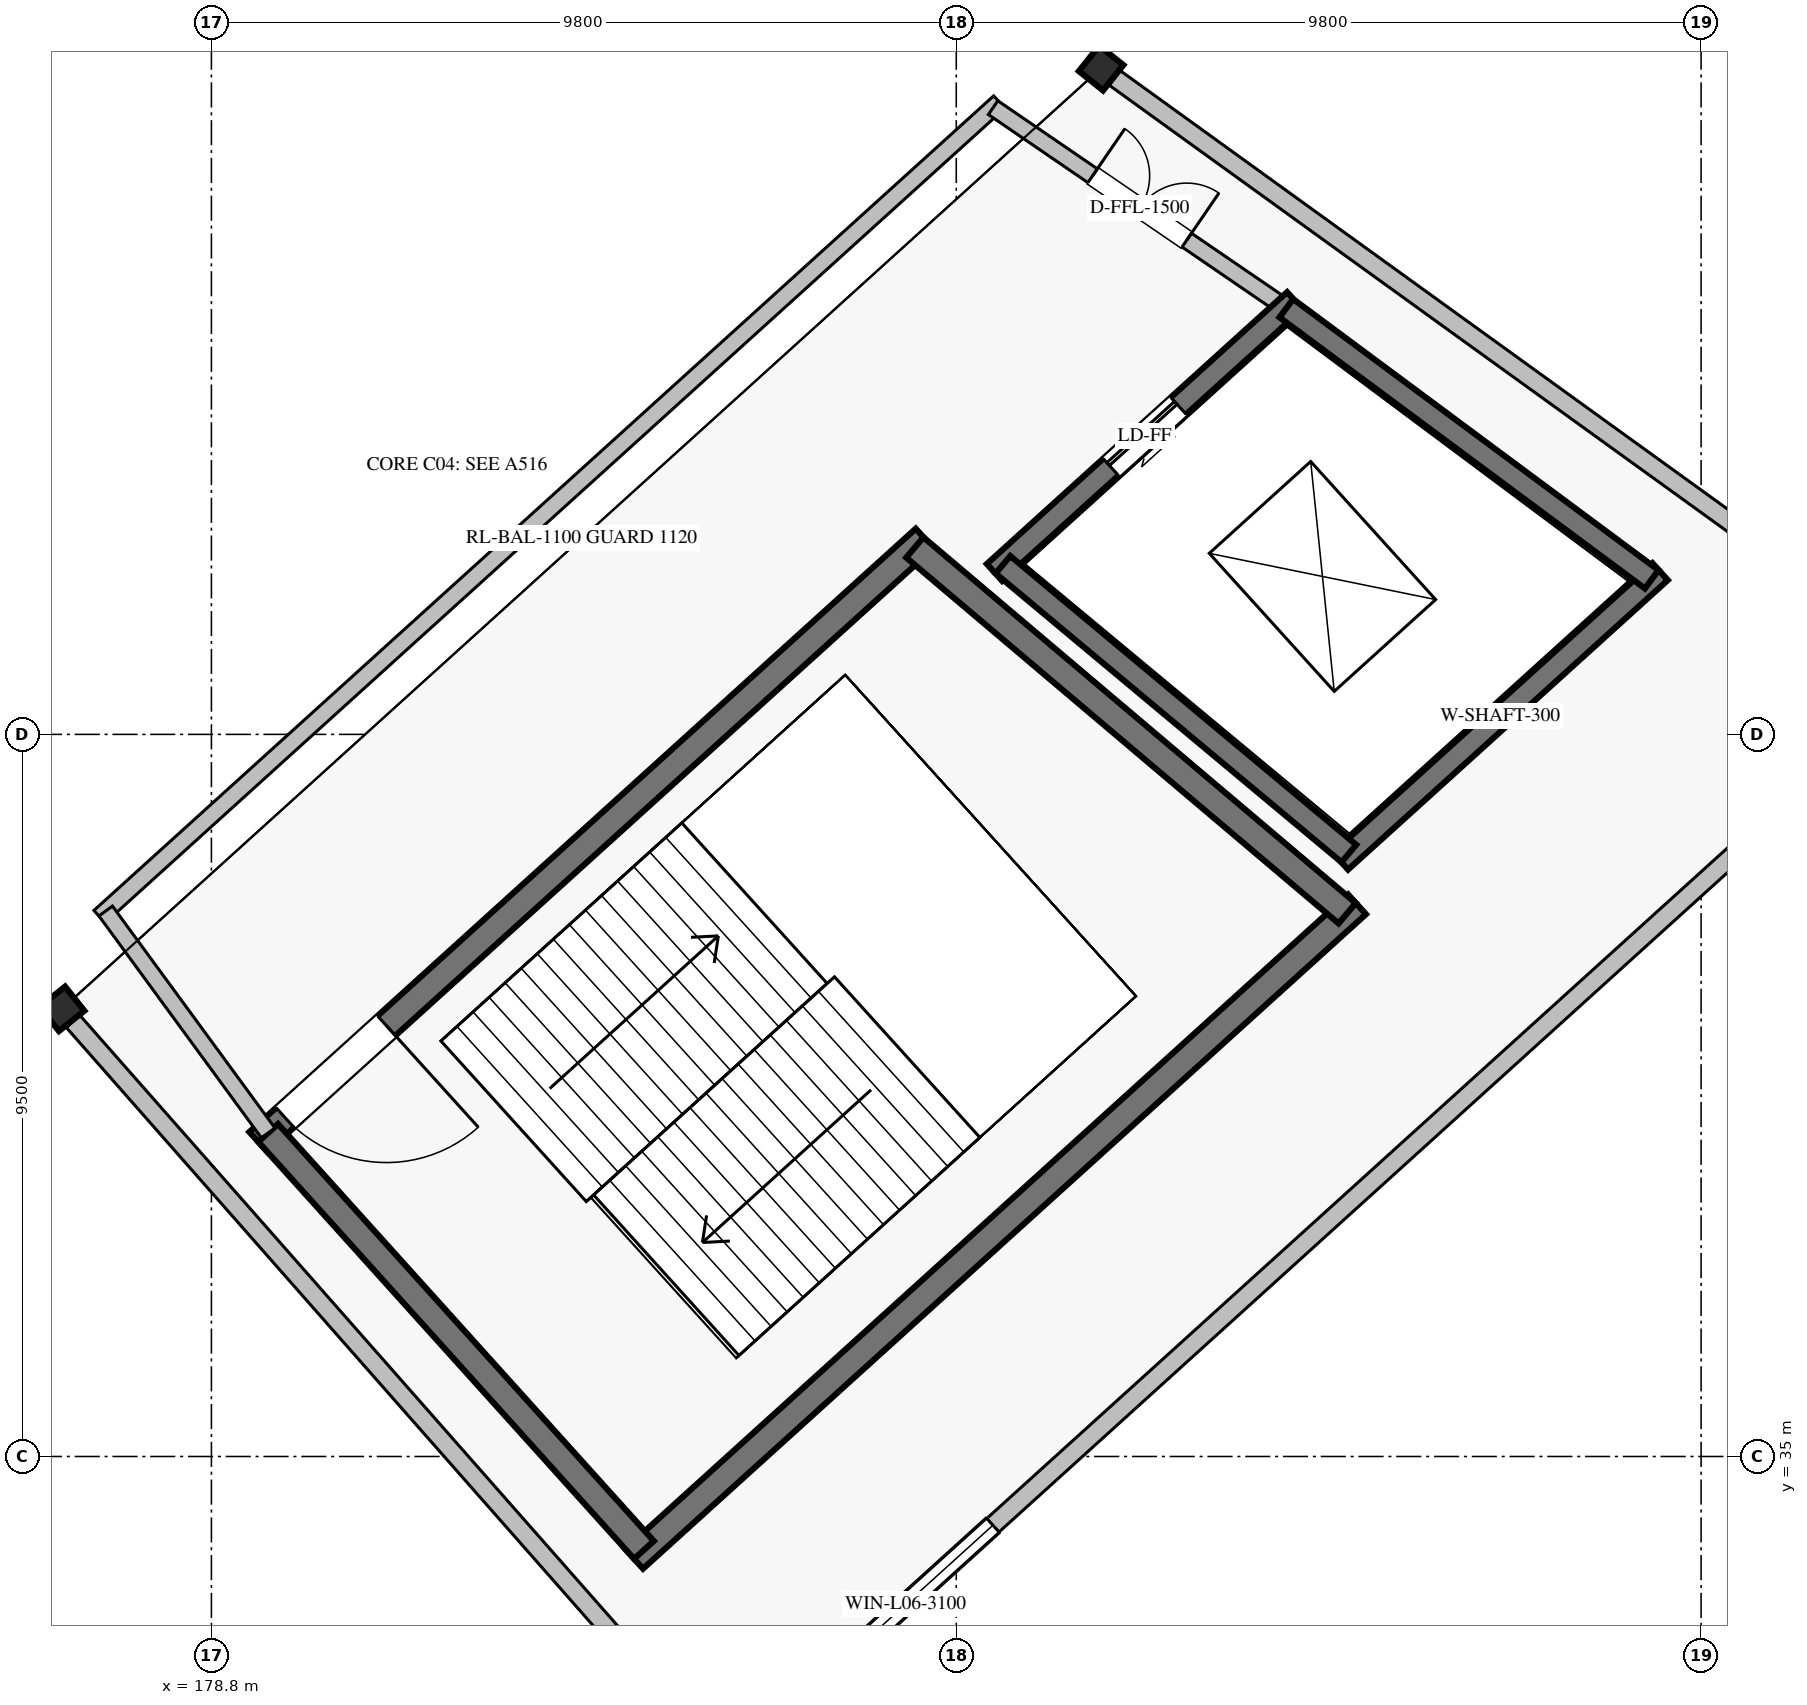
"""IFC4 building model, lengths in metres.
Left out: names, types, materials, properties, quantities, classifications, styles, units other than length and angle.
Written with IfcOpenShell. Run it as: python <this file> out.ifc"""

import sys

from ifc_helpers import new_model, si_unit, direction, frame, frame_2d, origin, origin_2d, place, context, subcontext, project, spatial, rectangle, i_section, extrude, element, fill, save


model = new_model("IFC4")
c1 = context("Model", 3, precision=1e-05, world=origin(), true_north=direction((0.0, 1.0)))
c2 = subcontext(c1, "Body", "Model", "MODEL_VIEW")
j1 = project(units=[si_unit("LENGTHUNIT", "METRE"), si_unit("PLANEANGLEUNIT", "RADIAN")], contexts=[c1])
p1 = place(None, origin())
s1 = spatial("IfcSite", under=j1, at=p1, CompositionType="ELEMENT")
p2 = place(p1, origin())
s2 = spatial("IfcBuilding", under=s1, at=p2, CompositionType="ELEMENT")
p3 = place(p2, frame((0.0, 0.0, 31.28)))
s3 = spatial("IfcBuildingStorey", under=s2, at=p3, CompositionType="ELEMENT", Elevation=31.28)
for number, where, z_axis, x_axis in (
    (1, (176.834, 40.889, 0.0), (0.0, 0.0, 1.0), (0.623, -0.782, 0.0)),
    (2, (190.506, 53.266, 0.0), (0.0, 0.0, 1.0), (0.782, -0.623, 0.0)),
):
    element("IfcColumn", number, at=place(p3, frame(where, z_axis=z_axis, x_axis=x_axis)), inside=s3, PredefinedType="COLUMN", context=c2, shape_type="SweptSolid", body=[
        extrude(i_section(OverallWidth=0.407, OverallDepth=0.428, WebThickness=0.02, FlangeThickness=0.035, FilletRadius=0.013, at=origin_2d()), origin(), (0.0, 0.0, 1.0), 5.44),
    ])
p4 = place(p3, frame((185.746, 31.075, 0.0), z_axis=(0.0, 0.0, 1.0), x_axis=(0.74134637924, 0.671122601309, 0.0)))
e3 = element("IfcWall", 3, at=p4, inside=s3, PredefinedType="SOLIDWALL", context=c2, shape_type="SweptSolid", body=[
    extrude(rectangle(XDim=21.044, YDim=0.24, at=frame_2d((10.522, 0.0))), origin(), (0.0, 0.0, 1.0), 4.358),
])
p5 = place(p4, frame((1.4, 0.0, 1.0)))
e4 = element("IfcOpeningElement", 4, at=p5, cuts=e3, PredefinedType="OPENING", context=c2, shape_type="SweptSolid", body=[
    extrude(rectangle(XDim=3.1, YDim=2.15, at=frame_2d((1.55, 1.075))), frame((0.0, 0.13, 0.0), z_axis=(0.0, -1.0, 0.0), x_axis=(1.0, 0.0, 0.0)), (0.0, 0.0, 1.0), 0.26),
])
p6 = place(p3, frame((176.98, 40.724, 0.0), z_axis=(0.0, 0.0, 1.0), x_axis=(0.661029266372, -0.750360119542, 0.0)))
e5 = element("IfcWall", 5, at=p6, inside=s3, PredefinedType="SOLIDWALL", context=c2, shape_type="SweptSolid", body=[
    extrude(rectangle(XDim=12.818, YDim=0.24, at=frame_2d((6.409, 0.0))), origin(), (0.0, 0.0, 1.0), 4.458),
])
p7 = place(p3, frame((190.684, 53.137, 0.0), z_axis=(0.0, 0.0, 1.0), x_axis=(0.810798505274, -0.585325365797, 0.0)))
e6 = element("IfcWall", 6, at=p7, inside=s3, PredefinedType="SOLIDWALL", context=c2, shape_type="SweptSolid", body=[
    extrude(rectangle(XDim=13.114, YDim=0.24, at=frame_2d((6.557, 0.0))), origin(), (0.0, 0.0, 1.0), 4.458),
])
p8 = place(p3, frame((179.417, 39.14, 0.0), z_axis=(0.0, 0.0, 1.0), x_axis=(0.741348929385, 0.671119784315, 0.0)))
e7 = element("IfcWall", 7, at=p8, inside=s3, PredefinedType="SHEAR", context=c2, shape_type="SweptSolid", body=[
    extrude(rectangle(XDim=11.826, YDim=0.35, at=frame_2d((5.913, 0.0))), origin(), (0.0, 0.0, 1.0), 5.16),
])
p9 = place(p8, frame((0.475, 0.0, 0.0)))
e8 = element("IfcOpeningElement", 8, at=p9, cuts=e7, PredefinedType="OPENING", context=c2, shape_type="SweptSolid", body=[
    extrude(rectangle(XDim=1.8, YDim=2.2, at=frame_2d((0.9, 1.1))), frame((0.0, 0.185, 0.0), z_axis=(0.0, -1.0, 0.0), x_axis=(1.0, 0.0, 0.0)), (0.0, 0.0, 1.0), 0.37),
])
p10 = place(p3, frame((184.361, 33.653, 0.0), z_axis=(0.0, 0.0, 1.0), x_axis=(0.741351373721, 0.671117084183, 0.0)))
e9 = element("IfcWall", 9, at=p10, inside=s3, PredefinedType="SHEAR", context=c2, shape_type="SweptSolid", body=[
    extrude(rectangle(XDim=12.83, YDim=0.35, at=frame_2d((6.415, 0.0))), origin(), (0.0, 0.0, 1.0), 5.16),
])
p11 = place(p3, frame((179.546, 39.257, 0.0), z_axis=(0.0, 0.0, 1.0), x_axis=(0.669463145673, -0.742845270958, 0.0)))
e10 = element("IfcWall", 10, at=p11, inside=s3, PredefinedType="SHEAR", context=c2, shape_type="SweptSolid", body=[
    extrude(rectangle(XDim=7.386, YDim=0.35, at=frame_2d((3.693, 0.0))), origin(), (0.0, 0.0, 1.0), 5.16),
])
p12 = place(p3, frame((188.055, 46.959, 0.0), z_axis=(0.0, 0.0, 1.0), x_axis=(0.763422324031, -0.64589964791, 0.0)))
e11 = element("IfcWall", 11, at=p12, inside=s3, PredefinedType="SHEAR", context=c2, shape_type="SweptSolid", body=[
    extrude(rectangle(XDim=7.452, YDim=0.35, at=frame_2d((3.726, 0.0))), origin(), (0.0, 0.0, 1.0), 5.16),
])
p13 = place(p3, frame((189.103, 46.631, 0.0), z_axis=(0.0, 0.0, 1.0), x_axis=(0.741350155641, 0.671118429736, 0.0)))
e12 = element("IfcWall", 12, at=p13, inside=s3, PredefinedType="SHEAR", context=c2, shape_type="SweptSolid", body=[
    extrude(rectangle(XDim=5.329, YDim=0.3, at=frame_2d((2.665, 0.0))), origin(), (0.0, 0.0, 1.0), 5.16),
])
p14 = place(p13, frame((2.065, 0.0, 0.0)))
e13 = element("IfcOpeningElement", 13, at=p14, cuts=e12, PredefinedType="OPENING", context=c2, shape_type="SweptSolid", body=[
    extrude(rectangle(XDim=1.2, YDim=2.2, at=frame_2d((0.6, 1.1))), frame((0.0, 0.16, 0.0), z_axis=(0.0, -1.0, 0.0), x_axis=(1.0, 0.0, 0.0)), (0.0, 0.0, 1.0), 0.32),
])
p15 = place(p3, frame((193.654, 42.832, 0.0), z_axis=(0.0, 0.0, 1.0), x_axis=(0.74134208775, 0.671127341815, 0.0)))
e14 = element("IfcWall", 14, at=p15, inside=s3, PredefinedType="SHEAR", context=c2, shape_type="SweptSolid", body=[
    extrude(rectangle(XDim=5.675, YDim=0.3, at=frame_2d((2.837, 0.0))), origin(), (0.0, 0.0, 1.0), 5.16),
])
p16 = place(p3, frame((189.214, 46.732, 0.0), z_axis=(0.0, 0.0, 1.0), x_axis=(0.767711354146, -0.640795815151, 0.0)))
e15 = element("IfcWall", 15, at=p16, inside=s3, PredefinedType="SHEAR", context=c2, shape_type="SweptSolid", body=[
    extrude(rectangle(XDim=5.929, YDim=0.3, at=frame_2d((2.964, 0.0))), origin(), (0.0, 0.0, 1.0), 5.16),
])
p17 = place(p3, frame((192.942, 50.107, 0.0), z_axis=(0.0, 0.0, 1.0), x_axis=(0.803101805449, -0.59584183311, 0.0)))
e16 = element("IfcWall", 16, at=p17, inside=s3, PredefinedType="SHEAR", context=c2, shape_type="SweptSolid", body=[
    extrude(rectangle(XDim=5.986, YDim=0.3, at=frame_2d((2.993, 0.0))), origin(), (0.0, 0.0, 1.0), 5.16),
])
p18 = place(p3, frame((177.327, 42.102, 0.0), z_axis=(0.0, 0.0, 1.0), x_axis=(0.741351035574, 0.671117457717, 0.0)))
e17 = element("IfcWall", 17, at=p18, inside=s3, PredefinedType="SOLIDWALL", context=c2, shape_type="SweptSolid", body=[
    extrude(rectangle(XDim=15.969, YDim=0.22, at=frame_2d((7.985, 0.0))), origin(), (0.0, 0.0, 1.0), 5.16),
])
p19 = place(p3, frame((177.409, 42.176, 0.0), z_axis=(0.0, 0.0, 1.0), x_axis=(0.590836915359, -0.806791013491, 0.0)))
e18 = element("IfcWall", 18, at=p19, inside=s3, PredefinedType="SOLIDWALL", context=c2, shape_type="SweptSolid", body=[
    extrude(rectangle(XDim=3.618, YDim=0.22, at=frame_2d((1.809, 0.0))), origin(), (0.0, 0.0, 1.0), 5.16),
])
p20 = place(p3, frame((189.085, 52.746, 0.0), z_axis=(0.0, 0.0, 1.0), x_axis=(0.825385410642, -0.564569680287, 0.0)))
e19 = element("IfcWall", 19, at=p20, inside=s3, PredefinedType="SOLIDWALL", context=c2, shape_type="SweptSolid", body=[
    extrude(rectangle(XDim=4.674, YDim=0.22, at=frame_2d((2.337, 0.0))), origin(), (0.0, 0.0, 1.0), 5.16),
])
p21 = place(p20, frame((1.587, 0.0, 0.0)))
e20 = element("IfcOpeningElement", 20, at=p21, cuts=e19, PredefinedType="OPENING", context=c2, shape_type="SweptSolid", body=[
    extrude(rectangle(XDim=1.5, YDim=2.2, at=frame_2d((0.75, 1.1))), frame((0.0, 0.12, 0.0), z_axis=(0.0, -1.0, 0.0), x_axis=(1.0, 0.0, 0.0)), (0.0, 0.0, 1.0), 0.24),
])
p22 = place(p5, origin())
e21 = element("IfcWindow", 21, at=p22, inside=s3, PartitioningType="SINGLE_PANEL", PredefinedType="WINDOW", context=c2, shape_type="SweptSolid", body=[
    extrude(rectangle(XDim=3.1, YDim=2.15, at=frame_2d((1.55, 1.075))), frame((0.0, 0.03, 0.0), z_axis=(0.0, -1.0, 0.0), x_axis=(1.0, 0.0, 0.0)), (0.0, 0.0, 1.0), 0.06),
])
fill(e4, e21)
p23 = place(p9, frame((1.8, 0.0, 0.0), z_axis=(0.0, 0.0, 1.0), x_axis=(-1.0, 0.0, 0.0)))
e22 = element("IfcDoor", 22, at=p23, inside=s3, OperationType="SINGLE_SWING_LEFT", PredefinedType="DOOR", context=c2, shape_type="SweptSolid", body=[
    extrude(rectangle(XDim=1.8, YDim=2.2, at=frame_2d((0.9, 1.1))), frame((0.0, 0.025, 0.0), z_axis=(0.0, -1.0, 0.0), x_axis=(1.0, 0.0, 0.0)), (0.0, 0.0, 1.0), 0.05),
])
fill(e8, e22)
p24 = place(p14, origin())
e23 = element("IfcDoor", 23, at=p24, inside=s3, OperationType="SLIDING_TO_LEFT", PredefinedType="DOOR", context=c2, shape_type="SweptSolid", body=[
    extrude(rectangle(XDim=1.2, YDim=2.2, at=frame_2d((0.6, 1.1))), frame((0.0, 0.025, 0.0), z_axis=(0.0, -1.0, 0.0), x_axis=(1.0, 0.0, 0.0)), (0.0, 0.0, 1.0), 0.05),
])
fill(e13, e23)
p25 = place(p21, origin())
e24 = element("IfcDoor", 24, at=p25, inside=s3, OperationType="DOUBLE_DOOR_SINGLE_SWING", PredefinedType="DOOR", context=c2, shape_type="SweptSolid", body=[
    extrude(rectangle(XDim=1.5, YDim=2.2, at=frame_2d((0.75, 1.1))), frame((0.0, 0.025, 0.0), z_axis=(0.0, -1.0, 0.0), x_axis=(1.0, 0.0, 0.0)), (0.0, 0.0, 1.0), 0.05),
])
fill(e20, e24)
save(model, sys.argv[1])
